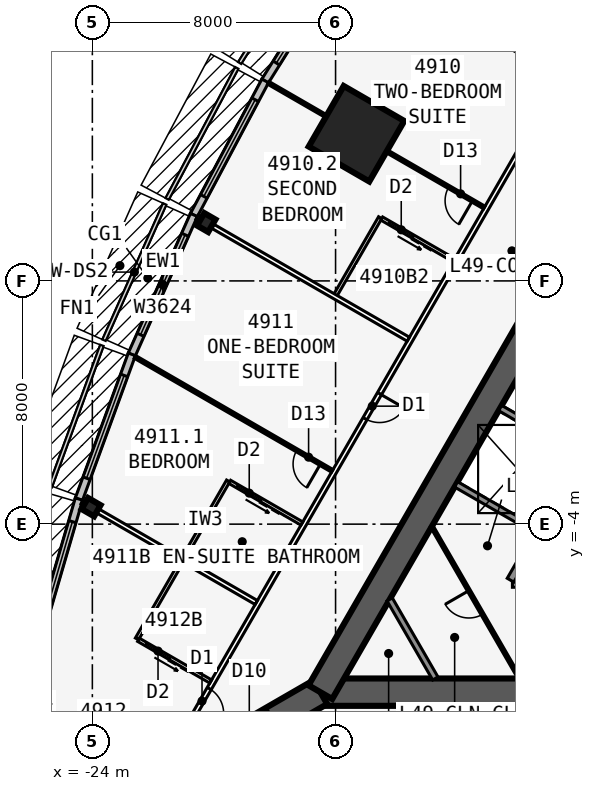
"""IFC4 building model, lengths in metres.
Left out: names, types, materials, properties, quantities, classifications, styles, units other than length and angle.
Written with IfcOpenShell. Run it as: python <this file> out.ifc"""

import sys

from ifc_helpers import new_model, si_unit, direction, frame, frame_2d, origin, origin_2d, place, context, subcontext, project, spatial, rectangle, i_section, extrude, element, fill, save


model = new_model("IFC4")
c1 = context("Model", 3, precision=1e-05, world=origin(), true_north=direction((0.0, 1.0)))
c2 = subcontext(c1, "Body", "Model", "MODEL_VIEW")
j1 = project(units=[si_unit("LENGTHUNIT", "METRE"), si_unit("PLANEANGLEUNIT", "RADIAN")], contexts=[c1])
p1 = place(None, origin())
s1 = spatial("IfcSite", under=j1, at=p1, CompositionType="ELEMENT")
p2 = place(p1, origin())
s2 = spatial("IfcBuilding", under=s1, at=p2, CompositionType="ELEMENT")
p3 = place(p2, frame((0.0, 0.0, 182.7)))
s3 = spatial("IfcBuildingStorey", under=s2, at=p3, CompositionType="ELEMENT", Elevation=182.7)
p4 = place(p3, frame((-16.5, -9.526, 0.0), z_axis=(0.0, 0.0, 1.0), x_axis=(1.0, 0.0, 0.0)))
e1 = element("IfcWall", 1, at=p4, inside=s3, PredefinedType="SHEAR", context=c2, shape_type="SweptSolid", body=[
    extrude(rectangle(XDim=33.0, YDim=0.9, at=frame_2d((16.5, 0.0))), origin(), (0.0, 0.0, 1.0), 3.4),
])
p5 = place(p4, frame((14.05, 0.0, 0.0)))
e2 = element("IfcOpeningElement", 2, at=p5, cuts=e1, PredefinedType="OPENING", context=c2, shape_type="SweptSolid", body=[
    extrude(rectangle(XDim=1.8, YDim=2.13, at=frame_2d((0.9, 1.065))), frame((0.0, 0.46, 0.0), z_axis=(0.0, -1.0, 0.0), x_axis=(1.0, 0.0, 0.0)), (0.0, 0.0, 1.0), 0.92),
])
p6 = place(p3, frame((-10.183, -5.951, 0.0), z_axis=(0.0, 0.0, 1.0), x_axis=(1.0, 0.0, 0.0)))
e3 = element("IfcWall", 3, at=p6, inside=s3, PredefinedType="SOLIDWALL", context=c2, shape_type="SweptSolid", body=[
    extrude(rectangle(XDim=7.633, YDim=0.25, at=frame_2d((3.816, 0.0))), origin(), (0.0, 0.0, 1.0), 3.235),
])
p7 = place(p3, frame((0.0, 19.052, 0.0), z_axis=(0.0, 0.0, 1.0), x_axis=(-0.499999749417, -0.866025548458, 0.0)))
e4 = element("IfcWall", 4, at=p7, inside=s3, PredefinedType="SHEAR", context=c2, shape_type="SweptSolid", body=[
    extrude(rectangle(XDim=33.0, YDim=0.9, at=frame_2d((16.5, 0.0))), origin(), (0.0, 0.0, 1.0), 3.4),
])
p8 = place(p7, frame((14.15, 0.0, 0.0)))
e5 = element("IfcOpeningElement", 5, at=p8, cuts=e4, PredefinedType="OPENING", context=c2, shape_type="SweptSolid", body=[
    extrude(rectangle(XDim=1.8, YDim=2.13, at=frame_2d((0.9, 1.065))), frame((0.0, 0.46, 0.0), z_axis=(0.0, -1.0, 0.0), x_axis=(1.0, 0.0, 0.0)), (0.0, 0.0, 1.0), 0.92),
])
p9 = place(p7, frame((12.6, 0.0, 0.0)))
e6 = element("IfcOpeningElement", 6, at=p9, cuts=e4, PredefinedType="OPENING", context=c2, shape_type="SweptSolid", body=[
    extrude(rectangle(XDim=1.0, YDim=2.13, at=frame_2d((0.5, 1.065))), frame((0.0, 0.46, 0.0), z_axis=(0.0, -1.0, 0.0), x_axis=(1.0, 0.0, 0.0)), (0.0, 0.0, 1.0), 0.92),
])
p10 = place(p3, frame((-4.929, 3.365, 0.0), z_axis=(0.0, 0.0, 1.0), x_axis=(-0.499991433582, -0.866030349552, 0.0)))
e7 = element("IfcWall", 7, at=p10, inside=s3, PredefinedType="SOLIDWALL", context=c2, shape_type="SweptSolid", body=[
    extrude(rectangle(XDim=10.633, YDim=0.25, at=frame_2d((5.316, 0.0))), origin(), (0.0, 0.0, 1.0), 3.235),
])
p11 = place(p10, frame((9.164, 0.0, 0.0)))
e8 = element("IfcOpeningElement", 8, at=p11, cuts=e7, PredefinedType="OPENING", context=c2, shape_type="SweptSolid", body=[
    extrude(rectangle(XDim=0.9, YDim=2.13, at=frame_2d((0.45, 1.065))), frame((0.0, 0.135, 0.0), z_axis=(0.0, -1.0, 0.0), x_axis=(1.0, 0.0, 0.0)), (0.0, 0.0, 1.0), 0.27),
])
for number, where, z_axis, x_axis in (
    (9, (-7.879, -1.744, 0.0), (0.0, 0.0, 1.0), (-0.866, 0.5, 0.0)),
    (10, (-9.329, -4.256, 0.0), (0.0, 0.0, 1.0), (-0.866, 0.5, 0.0)),
):
    element("IfcWall", number, at=place(p3, frame(where, z_axis=z_axis, x_axis=x_axis)), inside=s3, PredefinedType="SOLIDWALL", context=c2, shape_type="SweptSolid", body=[
        extrude(rectangle(XDim=3.125, YDim=0.2, at=frame_2d((1.562, 0.0))), origin(), (0.0, 0.0, 1.0), 3.235),
    ])
p12 = place(p3, frame((-16.5, -9.526, 0.0), z_axis=(0.0, 0.0, 1.0), x_axis=(-0.866031398331, -0.499989616998, 0.0)))
e11 = element("IfcWall", 11, at=p12, inside=s3, PredefinedType="SHEAR", context=c2, shape_type="SweptSolid", body=[
    extrude(rectangle(XDim=4.746, YDim=0.9, at=frame_2d((2.373, 0.0))), origin(), (0.0, 0.0, 1.0), 3.4),
])
p13 = place(p12, frame((1.8, 0.0, 0.0)))
e12 = element("IfcOpeningElement", 12, at=p13, cuts=e11, PredefinedType="OPENING", context=c2, shape_type="SweptSolid", body=[
    extrude(rectangle(XDim=1.8, YDim=2.13, at=frame_2d((0.9, 1.065))), frame((0.0, 0.46, 0.0), z_axis=(0.0, -1.0, 0.0), x_axis=(1.0, 0.0, 0.0)), (0.0, 0.0, 1.0), 0.92),
])
for number, where, z_axis, x_axis in (
    (13, (-20.254, 5.92, 0.0), (0.0, 0.0, 1.0), (-0.866, 0.5, 0.0)),
    (14, (-24.041, -3.44, 0.0), (0.0, 0.0, 1.0), (-0.5, -0.866, 0.0)),
):
    element("IfcColumn", number, at=place(p3, frame(where, z_axis=z_axis, x_axis=x_axis)), inside=s3, PredefinedType="COLUMN", context=c2, shape_type="SweptSolid", body=[
        extrude(i_section(OverallWidth=0.424, OverallDepth=0.475, WebThickness=0.048, FlangeThickness=0.077, at=origin_2d()), origin(), (0.0, 0.0, 1.0), 3.4),
    ])
p14 = place(p3, frame((-15.312, 8.84, 0.0), z_axis=(0.0, 0.0, 1.0), x_axis=(-0.866025403784, 0.5, 0.0)))
e15 = element("IfcColumn", 15, at=p14, inside=s3, PredefinedType="COLUMN", context=c2, shape_type="SweptSolid", body=[
    extrude(rectangle(XDim=2.3, YDim=2.3, at=origin_2d()), origin(), (0.0, 0.0, 1.0), 3.4),
])
p15 = place(p3, frame((-15.667, 14.814, 0.0), z_axis=(0.0, 0.0, 1.0), x_axis=(-0.529990167382, -0.84800378683, 0.0)))
e16 = element("IfcWall", 16, at=p15, inside=s3, PredefinedType="STANDARD", context=c2, shape_type="SweptSolid", body=[
    extrude(rectangle(XDim=5.003, YDim=0.25, at=frame_2d((2.501, 0.0))), origin(), (0.0, 0.0, 1.0), 3.235),
])
p16 = place(p15, frame((0.701, 0.0, 0.45)))
e17 = element("IfcOpeningElement", 17, at=p16, cuts=e16, PredefinedType="OPENING", context=c2, shape_type="SweptSolid", body=[
    extrude(rectangle(XDim=3.6, YDim=2.4, at=frame_2d((1.8, 1.2))), frame((0.0, 0.135, 0.0), z_axis=(0.0, -1.0, 0.0), x_axis=(1.0, 0.0, 0.0)), (0.0, 0.0, 1.0), 0.27),
])
p17 = place(p3, frame((-18.314, 10.579, 0.0), z_axis=(0.0, 0.0, 1.0), x_axis=(-0.469404966864, -0.882982999317, 0.0)))
e18 = element("IfcWall", 18, at=p17, inside=s3, PredefinedType="STANDARD", context=c2, shape_type="SweptSolid", body=[
    extrude(rectangle(XDim=5.003, YDim=0.25, at=frame_2d((2.501, 0.0))), origin(), (0.0, 0.0, 1.0), 3.235),
])
p18 = place(p17, frame((0.701, 0.0, 0.45)))
e19 = element("IfcOpeningElement", 19, at=p18, cuts=e18, PredefinedType="OPENING", context=c2, shape_type="SweptSolid", body=[
    extrude(rectangle(XDim=3.6, YDim=2.4, at=frame_2d((1.8, 1.2))), frame((0.0, 0.135, 0.0), z_axis=(0.0, -1.0, 0.0), x_axis=(1.0, 0.0, 0.0)), (0.0, 0.0, 1.0), 0.27),
])
p19 = place(p3, frame((-20.659, 6.169, 0.0), z_axis=(0.0, 0.0, 1.0), x_axis=(-0.406832200364, -0.913502906808, 0.0)))
e20 = element("IfcWall", 20, at=p19, inside=s3, PredefinedType="STANDARD", context=c2, shape_type="SweptSolid", body=[
    extrude(rectangle(XDim=5.028, YDim=0.25, at=frame_2d((2.514, 0.0))), origin(), (0.0, 0.0, 1.0), 3.235),
])
p20 = place(p19, frame((0.714, 0.0, 0.45)))
e21 = element("IfcOpeningElement", 21, at=p20, cuts=e20, PredefinedType="OPENING", context=c2, shape_type="SweptSolid", body=[
    extrude(rectangle(XDim=3.6, YDim=2.4, at=frame_2d((1.8, 1.2))), frame((0.0, 0.135, 0.0), z_axis=(0.0, -1.0, 0.0), x_axis=(1.0, 0.0, 0.0)), (0.0, 0.0, 1.0), 0.27),
])
p21 = place(p3, frame((-22.701, 1.584, 0.0), z_axis=(0.0, 0.0, 1.0), x_axis=(-0.343225593282, -0.939252996863, 0.0)))
e22 = element("IfcWall", 22, at=p21, inside=s3, PredefinedType="STANDARD", context=c2, shape_type="SweptSolid", body=[
    extrude(rectangle(XDim=5.076, YDim=0.25, at=frame_2d((2.538, 0.0))), origin(), (0.0, 0.0, 1.0), 3.235),
])
p22 = place(p21, frame((0.738, 0.0, 0.45)))
e23 = element("IfcOpeningElement", 23, at=p22, cuts=e22, PredefinedType="OPENING", context=c2, shape_type="SweptSolid", body=[
    extrude(rectangle(XDim=3.6, YDim=2.4, at=frame_2d((1.8, 1.2))), frame((0.0, 0.135, 0.0), z_axis=(0.0, -1.0, 0.0), x_axis=(1.0, 0.0, 0.0)), (0.0, 0.0, 1.0), 0.27),
])
p23 = place(p3, frame((-24.441, -3.175, 0.0), z_axis=(0.0, 0.0, 1.0), x_axis=(-0.279528287117, -0.960137457191, 0.0)))
e24 = element("IfcWall", 24, at=p23, inside=s3, PredefinedType="STANDARD", context=c2, shape_type="SweptSolid", body=[
    extrude(rectangle(XDim=5.148, YDim=0.25, at=frame_2d((2.574, 0.0))), origin(), (0.0, 0.0, 1.0), 3.235),
])
p24 = place(p23, frame((0.774, 0.0, 0.45)))
e25 = element("IfcOpeningElement", 25, at=p24, cuts=e24, PredefinedType="OPENING", context=c2, shape_type="SweptSolid", body=[
    extrude(rectangle(XDim=3.6, YDim=2.4, at=frame_2d((1.8, 1.2))), frame((0.0, 0.135, 0.0), z_axis=(0.0, -1.0, 0.0), x_axis=(1.0, 0.0, 0.0)), (0.0, 0.0, 1.0), 0.27),
])
p25 = place(p3, frame((-0.5, 24.636, 0.0), z_axis=(0.0, 0.0, 1.0), x_axis=(-0.500001915564, -0.86602429783, 0.0)))
e26 = element("IfcWall", 26, at=p25, inside=s3, PredefinedType="PARTITIONING", context=c2, shape_type="SweptSolid", body=[
    extrude(rectangle(XDim=42.172, YDim=0.15, at=frame_2d((21.086, 0.0))), origin(), (0.0, 0.0, 1.0), 3.235),
])
p26 = place(p25, frame((2.338, 0.0, 0.0)))
e27 = element("IfcOpeningElement", 27, at=p26, cuts=e26, PredefinedType="OPENING", context=c2, shape_type="SweptSolid", body=[
    extrude(rectangle(XDim=0.95, YDim=2.13, at=frame_2d((0.475, 1.065))), frame((0.0, 0.085, 0.0), z_axis=(0.0, -1.0, 0.0), x_axis=(1.0, 0.0, 0.0)), (0.0, 0.0, 1.0), 0.17),
])
p27 = place(p25, frame((18.111, 0.0, 0.0)))
e28 = element("IfcOpeningElement", 28, at=p27, cuts=e26, PredefinedType="OPENING", context=c2, shape_type="SweptSolid", body=[
    extrude(rectangle(XDim=0.95, YDim=2.13, at=frame_2d((0.475, 1.065))), frame((0.0, 0.085, 0.0), z_axis=(0.0, -1.0, 0.0), x_axis=(1.0, 0.0, 0.0)), (0.0, 0.0, 1.0), 0.17),
])
p28 = place(p25, frame((28.111, 0.0, 0.0)))
e29 = element("IfcOpeningElement", 29, at=p28, cuts=e26, PredefinedType="OPENING", context=c2, shape_type="SweptSolid", body=[
    extrude(rectangle(XDim=0.95, YDim=2.13, at=frame_2d((0.475, 1.065))), frame((0.0, 0.085, 0.0), z_axis=(0.0, -1.0, 0.0), x_axis=(1.0, 0.0, 0.0)), (0.0, 0.0, 1.0), 0.17),
])
p29 = place(p25, frame((39.311, 0.0, 0.0)))
e30 = element("IfcOpeningElement", 30, at=p29, cuts=e26, PredefinedType="OPENING", context=c2, shape_type="SweptSolid", body=[
    extrude(rectangle(XDim=0.95, YDim=2.13, at=frame_2d((0.475, 1.065))), frame((0.0, 0.085, 0.0), z_axis=(0.0, -1.0, 0.0), x_axis=(1.0, 0.0, 0.0)), (0.0, 0.0, 1.0), 0.17),
])
p30 = place(p3, frame((-8.608, 10.743, 0.0), z_axis=(0.0, 0.0, 1.0), x_axis=(-0.866041663918, 0.499971835565, 0.0)))
e31 = element("IfcWall", 31, at=p30, inside=s3, PredefinedType="PARTITIONING", context=c2, shape_type="SweptSolid", body=[
    extrude(rectangle(XDim=8.022, YDim=0.1, at=frame_2d((4.011, 0.0))), origin(), (0.0, 0.0, 1.0), 2.389),
])
p31 = place(p30, frame((0.45, 0.0, 0.0)))
e32 = element("IfcOpeningElement", 32, at=p31, cuts=e31, PredefinedType="OPENING", context=c2, shape_type="SweptSolid", body=[
    extrude(rectangle(XDim=0.9, YDim=2.13, at=frame_2d((0.45, 1.065))), frame((0.0, 0.06, 0.0), z_axis=(0.0, -1.0, 0.0), x_axis=(1.0, 0.0, 0.0)), (0.0, 0.0, 1.0), 0.12),
])
p32 = place(p3, frame((-11.108, 6.413, 0.0), z_axis=(0.0, 0.0, 1.0), x_axis=(-0.866026407964, 0.499998260706, 0.0)))
e33 = element("IfcWall", 33, at=p32, inside=s3, PredefinedType="PARTITIONING", context=c2, shape_type="SweptSolid", body=[
    extrude(rectangle(XDim=8.199, YDim=0.1, at=frame_2d((4.099, 0.0))), origin(), (0.0, 0.0, 1.0), 2.389),
])
p33 = place(p32, frame((0.45, 0.0, 0.0)))
e34 = element("IfcOpeningElement", 34, at=p33, cuts=e33, PredefinedType="OPENING", context=c2, shape_type="SweptSolid", body=[
    extrude(rectangle(XDim=0.9, YDim=2.13, at=frame_2d((0.45, 1.065))), frame((0.0, 0.06, 0.0), z_axis=(0.0, -1.0, 0.0), x_axis=(1.0, 0.0, 0.0)), (0.0, 0.0, 1.0), 0.12),
])
p34 = place(p3, frame((-13.608, 2.083, 0.0), z_axis=(0.0, 0.0, 1.0), x_axis=(-0.866028486751, 0.499994660107, 0.0)))
e35 = element("IfcWall", 35, at=p34, inside=s3, PredefinedType="PARTITIONING", context=c2, shape_type="SweptSolid", body=[
    extrude(rectangle(XDim=8.022, YDim=0.15, at=frame_2d((4.011, 0.0))), origin(), (0.0, 0.0, 1.0), 2.389),
])
p35 = place(p3, frame((-16.108, -2.247, 0.0), z_axis=(0.0, 0.0, 1.0), x_axis=(-0.866025567496, 0.499999716443, 0.0)))
e36 = element("IfcWall", 36, at=p35, inside=s3, PredefinedType="PARTITIONING", context=c2, shape_type="SweptSolid", body=[
    extrude(rectangle(XDim=7.495, YDim=0.1, at=frame_2d((3.748, 0.0))), origin(), (0.0, 0.0, 1.0), 2.389),
])
p36 = place(p35, frame((0.45, 0.0, 0.0)))
e37 = element("IfcOpeningElement", 37, at=p36, cuts=e36, PredefinedType="OPENING", context=c2, shape_type="SweptSolid", body=[
    extrude(rectangle(XDim=0.9, YDim=2.13, at=frame_2d((0.45, 1.065))), frame((0.0, 0.06, 0.0), z_axis=(0.0, -1.0, 0.0), x_axis=(1.0, 0.0, 0.0)), (0.0, 0.0, 1.0), 0.12),
])
p37 = place(p3, frame((-18.608, -6.577, 0.0), z_axis=(0.0, 0.0, 1.0), x_axis=(-0.866031967744, 0.499988630717, 0.0)))
e38 = element("IfcWall", 38, at=p37, inside=s3, PredefinedType="PARTITIONING", context=c2, shape_type="SweptSolid", body=[
    extrude(rectangle(XDim=6.616, YDim=0.15, at=frame_2d((3.308, 0.0))), origin(), (0.0, 0.0, 1.0), 2.389),
])
p38 = place(p3, frame((-14.533, 6.081, 0.0), z_axis=(0.0, 0.0, 1.0), x_axis=(-0.499990139034, -0.866031096941, 0.0)))
e39 = element("IfcWall", 39, at=p38, inside=s3, PredefinedType="PLUMBINGWALL", context=c2, shape_type="SweptSolid", body=[
    extrude(rectangle(XDim=3.0, YDim=0.12, at=frame_2d((1.5, 0.0))), origin(), (0.0, 0.0, 1.0), 3.235),
])
p39 = place(p3, frame((-12.108, 4.681, 0.0), z_axis=(0.0, 0.0, 1.0), x_axis=(-0.866035715982, 0.499982138324, 0.0)))
e40 = element("IfcWall", 40, at=p39, inside=s3, PredefinedType="PLUMBINGWALL", context=c2, shape_type="SweptSolid", body=[
    extrude(rectangle(XDim=2.74, YDim=0.12, at=frame_2d((1.37, 0.0))), origin(), (0.0, 0.0, 1.0), 3.235),
])
p40 = place(p39, frame((1.55, 0.0, 0.0)))
e41 = element("IfcOpeningElement", 41, at=p40, cuts=e40, PredefinedType="OPENING", context=c2, shape_type="SweptSolid", body=[
    extrude(rectangle(XDim=0.9, YDim=2.13, at=frame_2d((0.45, 1.065))), frame((0.0, 0.07, 0.0), z_axis=(0.0, -1.0, 0.0), x_axis=(1.0, 0.0, 0.0)), (0.0, 0.0, 1.0), 0.14),
])
p41 = place(p3, frame((-19.533, -2.579, 0.0), z_axis=(0.0, 0.0, 1.0), x_axis=(-0.499990139034, -0.866031096941, 0.0)))
e42 = element("IfcWall", 42, at=p41, inside=s3, PredefinedType="PLUMBINGWALL", context=c2, shape_type="SweptSolid", body=[
    extrude(rectangle(XDim=3.0, YDim=0.12, at=frame_2d((1.5, 0.0))), origin(), (0.0, 0.0, 1.0), 3.235),
])
p42 = place(p3, frame((-17.108, -3.979, 0.0), z_axis=(0.0, 0.0, 1.0), x_axis=(-0.865997131366, 0.500048966069, 0.0)))
e43 = element("IfcWall", 43, at=p42, inside=s3, PredefinedType="PLUMBINGWALL", context=c2, shape_type="SweptSolid", body=[
    extrude(rectangle(XDim=2.74, YDim=0.12, at=frame_2d((1.37, 0.0))), origin(), (0.0, 0.0, 1.0), 3.235),
])
p43 = place(p42, frame((1.55, 0.0, 0.0)))
e44 = element("IfcOpeningElement", 44, at=p43, cuts=e43, PredefinedType="OPENING", context=c2, shape_type="SweptSolid", body=[
    extrude(rectangle(XDim=0.9, YDim=2.13, at=frame_2d((0.45, 1.065))), frame((0.0, 0.07, 0.0), z_axis=(0.0, -1.0, 0.0), x_axis=(1.0, 0.0, 0.0)), (0.0, 0.0, 1.0), 0.14),
])
p44 = place(p3, frame((-21.033, -5.177, 0.0), z_axis=(0.0, 0.0, 1.0), x_axis=(-0.499990139034, -0.866031096941, 0.0)))
e45 = element("IfcWall", 45, at=p44, inside=s3, PredefinedType="PLUMBINGWALL", context=c2, shape_type="SweptSolid", body=[
    extrude(rectangle(XDim=3.0, YDim=0.12, at=frame_2d((1.5, 0.0))), origin(), (0.0, 0.0, 1.0), 3.235),
])
p45 = place(p3, frame((-20.108, -9.175, 0.0), z_axis=(0.0, 0.0, 1.0), x_axis=(-0.866035715982, 0.499982138324, 0.0)))
e46 = element("IfcWall", 46, at=p45, inside=s3, PredefinedType="PLUMBINGWALL", context=c2, shape_type="SweptSolid", body=[
    extrude(rectangle(XDim=2.74, YDim=0.12, at=frame_2d((1.37, 0.0))), origin(), (0.0, 0.0, 1.0), 3.235),
])
p46 = place(p45, frame((1.55, 0.0, 0.0)))
e47 = element("IfcOpeningElement", 47, at=p46, cuts=e46, PredefinedType="OPENING", context=c2, shape_type="SweptSolid", body=[
    extrude(rectangle(XDim=0.9, YDim=2.13, at=frame_2d((0.45, 1.065))), frame((0.0, 0.07, 0.0), z_axis=(0.0, -1.0, 0.0), x_axis=(1.0, 0.0, 0.0)), (0.0, 0.0, 1.0), 0.14),
])
p47 = place(p3, frame((-12.719, -9.076, 0.0), z_axis=(0.0, 0.0, 1.0), x_axis=(-0.499952404951, 0.866052881055, 0.0)))
e48 = element("IfcWall", 48, at=p47, inside=s3, PredefinedType="SOLIDWALL", context=c2, shape_type="SweptSolid", body=[
    extrude(rectangle(XDim=3.002, YDim=0.2, at=frame_2d((1.501, 0.0))), origin(), (0.0, 0.0, 1.0), 3.235),
])
p48 = place(p3, frame((-9.947, -9.076, 0.0), z_axis=(0.0, 0.0, 1.0), x_axis=(-0.500027479704, 0.866009537788, 0.0)))
e49 = element("IfcWall", 49, at=p48, inside=s3, PredefinedType="PARTITIONING", context=c2, shape_type="SweptSolid", body=[
    extrude(rectangle(XDim=5.774, YDim=0.1, at=frame_2d((2.887, 0.0))), origin(), (0.0, 0.0, 1.0), 3.235),
])
p49 = place(p48, frame((2.437, 0.0, 0.0)))
e50 = element("IfcOpeningElement", 50, at=p49, cuts=e49, PredefinedType="OPENING", context=c2, shape_type="SweptSolid", body=[
    extrude(rectangle(XDim=0.9, YDim=2.13, at=frame_2d((0.45, 1.065))), frame((0.0, 0.06, 0.0), z_axis=(0.0, -1.0, 0.0), x_axis=(1.0, 0.0, 0.0)), (0.0, 0.0, 1.0), 0.12),
])
p50 = place(p16, origin())
e51 = element("IfcWindow", 51, at=p50, inside=s3, PartitioningType="SINGLE_PANEL", PredefinedType="WINDOW", context=c2, shape_type="SweptSolid", body=[
    extrude(rectangle(XDim=3.6, YDim=2.4, at=frame_2d((1.8, 1.2))), frame((0.0, 0.03, 0.0), z_axis=(0.0, -1.0, 0.0), x_axis=(1.0, 0.0, 0.0)), (0.0, 0.0, 1.0), 0.06),
])
fill(e17, e51)
p51 = place(p18, origin())
e52 = element("IfcWindow", 52, at=p51, inside=s3, PartitioningType="SINGLE_PANEL", PredefinedType="WINDOW", context=c2, shape_type="SweptSolid", body=[
    extrude(rectangle(XDim=3.6, YDim=2.4, at=frame_2d((1.8, 1.2))), frame((0.0, 0.03, 0.0), z_axis=(0.0, -1.0, 0.0), x_axis=(1.0, 0.0, 0.0)), (0.0, 0.0, 1.0), 0.06),
])
fill(e19, e52)
p52 = place(p20, origin())
e53 = element("IfcWindow", 53, at=p52, inside=s3, PartitioningType="SINGLE_PANEL", PredefinedType="WINDOW", context=c2, shape_type="SweptSolid", body=[
    extrude(rectangle(XDim=3.6, YDim=2.4, at=frame_2d((1.8, 1.2))), frame((0.0, 0.03, 0.0), z_axis=(0.0, -1.0, 0.0), x_axis=(1.0, 0.0, 0.0)), (0.0, 0.0, 1.0), 0.06),
])
fill(e21, e53)
p53 = place(p22, origin())
e54 = element("IfcWindow", 54, at=p53, inside=s3, PartitioningType="SINGLE_PANEL", PredefinedType="WINDOW", context=c2, shape_type="SweptSolid", body=[
    extrude(rectangle(XDim=3.6, YDim=2.4, at=frame_2d((1.8, 1.2))), frame((0.0, 0.03, 0.0), z_axis=(0.0, -1.0, 0.0), x_axis=(1.0, 0.0, 0.0)), (0.0, 0.0, 1.0), 0.06),
])
fill(e23, e54)
p54 = place(p24, origin())
e55 = element("IfcWindow", 55, at=p54, inside=s3, PartitioningType="SINGLE_PANEL", PredefinedType="WINDOW", context=c2, shape_type="SweptSolid", body=[
    extrude(rectangle(XDim=3.6, YDim=2.4, at=frame_2d((1.8, 1.2))), frame((0.0, 0.03, 0.0), z_axis=(0.0, -1.0, 0.0), x_axis=(1.0, 0.0, 0.0)), (0.0, 0.0, 1.0), 0.06),
])
fill(e25, e55)
p55 = place(p33, origin())
e56 = element("IfcDoor", 56, at=p55, inside=s3, OperationType="SINGLE_SWING_LEFT", PredefinedType="DOOR", context=c2, shape_type="SweptSolid", body=[
    extrude(rectangle(XDim=0.9, YDim=2.13, at=frame_2d((0.45, 1.065))), frame((0.0, 0.025, 0.0), z_axis=(0.0, -1.0, 0.0), x_axis=(1.0, 0.0, 0.0)), (0.0, 0.0, 1.0), 0.05),
])
fill(e34, e56)
p56 = place(p36, origin())
e57 = element("IfcDoor", 57, at=p56, inside=s3, OperationType="SINGLE_SWING_LEFT", PredefinedType="DOOR", context=c2, shape_type="SweptSolid", body=[
    extrude(rectangle(XDim=0.9, YDim=2.13, at=frame_2d((0.45, 1.065))), frame((0.0, 0.025, 0.0), z_axis=(0.0, -1.0, 0.0), x_axis=(1.0, 0.0, 0.0)), (0.0, 0.0, 1.0), 0.05),
])
fill(e37, e57)
p57 = place(p40, origin())
e58 = element("IfcDoor", 58, at=p57, inside=s3, OperationType="SLIDING_TO_LEFT", PredefinedType="DOOR", context=c2, shape_type="SweptSolid", body=[
    extrude(rectangle(XDim=0.9, YDim=2.13, at=frame_2d((0.45, 1.065))), frame((0.0, 0.025, 0.0), z_axis=(0.0, -1.0, 0.0), x_axis=(1.0, 0.0, 0.0)), (0.0, 0.0, 1.0), 0.05),
])
fill(e41, e58)
p58 = place(p28, origin())
e59 = element("IfcDoor", 59, at=p58, inside=s3, OperationType="SINGLE_SWING_LEFT", PredefinedType="DOOR", context=c2, shape_type="SweptSolid", body=[
    extrude(rectangle(XDim=0.95, YDim=2.13, at=frame_2d((0.475, 1.065))), frame((0.0, 0.025, 0.0), z_axis=(0.0, -1.0, 0.0), x_axis=(1.0, 0.0, 0.0)), (0.0, 0.0, 1.0), 0.05),
])
fill(e29, e59)
p59 = place(p43, origin())
e60 = element("IfcDoor", 60, at=p59, inside=s3, OperationType="SLIDING_TO_LEFT", PredefinedType="DOOR", context=c2, shape_type="SweptSolid", body=[
    extrude(rectangle(XDim=0.9, YDim=2.13, at=frame_2d((0.45, 1.065))), frame((0.0, 0.025, 0.0), z_axis=(0.0, -1.0, 0.0), x_axis=(1.0, 0.0, 0.0)), (0.0, 0.0, 1.0), 0.05),
])
fill(e44, e60)
p60 = place(p46, origin())
e61 = element("IfcDoor", 61, at=p60, inside=s3, OperationType="SLIDING_TO_LEFT", PredefinedType="DOOR", context=c2, shape_type="SweptSolid", body=[
    extrude(rectangle(XDim=0.9, YDim=2.13, at=frame_2d((0.45, 1.065))), frame((0.0, 0.025, 0.0), z_axis=(0.0, -1.0, 0.0), x_axis=(1.0, 0.0, 0.0)), (0.0, 0.0, 1.0), 0.05),
])
fill(e47, e61)
p61 = place(p29, origin())
e62 = element("IfcDoor", 62, at=p61, inside=s3, OperationType="SINGLE_SWING_RIGHT", PredefinedType="DOOR", context=c2, shape_type="SweptSolid", body=[
    extrude(rectangle(XDim=0.95, YDim=2.13, at=frame_2d((0.475, 1.065))), frame((0.0, 0.025, 0.0), z_axis=(0.0, -1.0, 0.0), x_axis=(1.0, 0.0, 0.0)), (0.0, 0.0, 1.0), 0.05),
])
fill(e30, e62)
p62 = place(p49, origin())
e63 = element("IfcDoor", 63, at=p62, inside=s3, OperationType="SINGLE_SWING_RIGHT", PredefinedType="DOOR", context=c2, shape_type="SweptSolid", body=[
    extrude(rectangle(XDim=0.9, YDim=2.13, at=frame_2d((0.45, 1.065))), frame((0.0, 0.025, 0.0), z_axis=(0.0, -1.0, 0.0), x_axis=(1.0, 0.0, 0.0)), (0.0, 0.0, 1.0), 0.05),
])
fill(e50, e63)
save(model, sys.argv[1])
